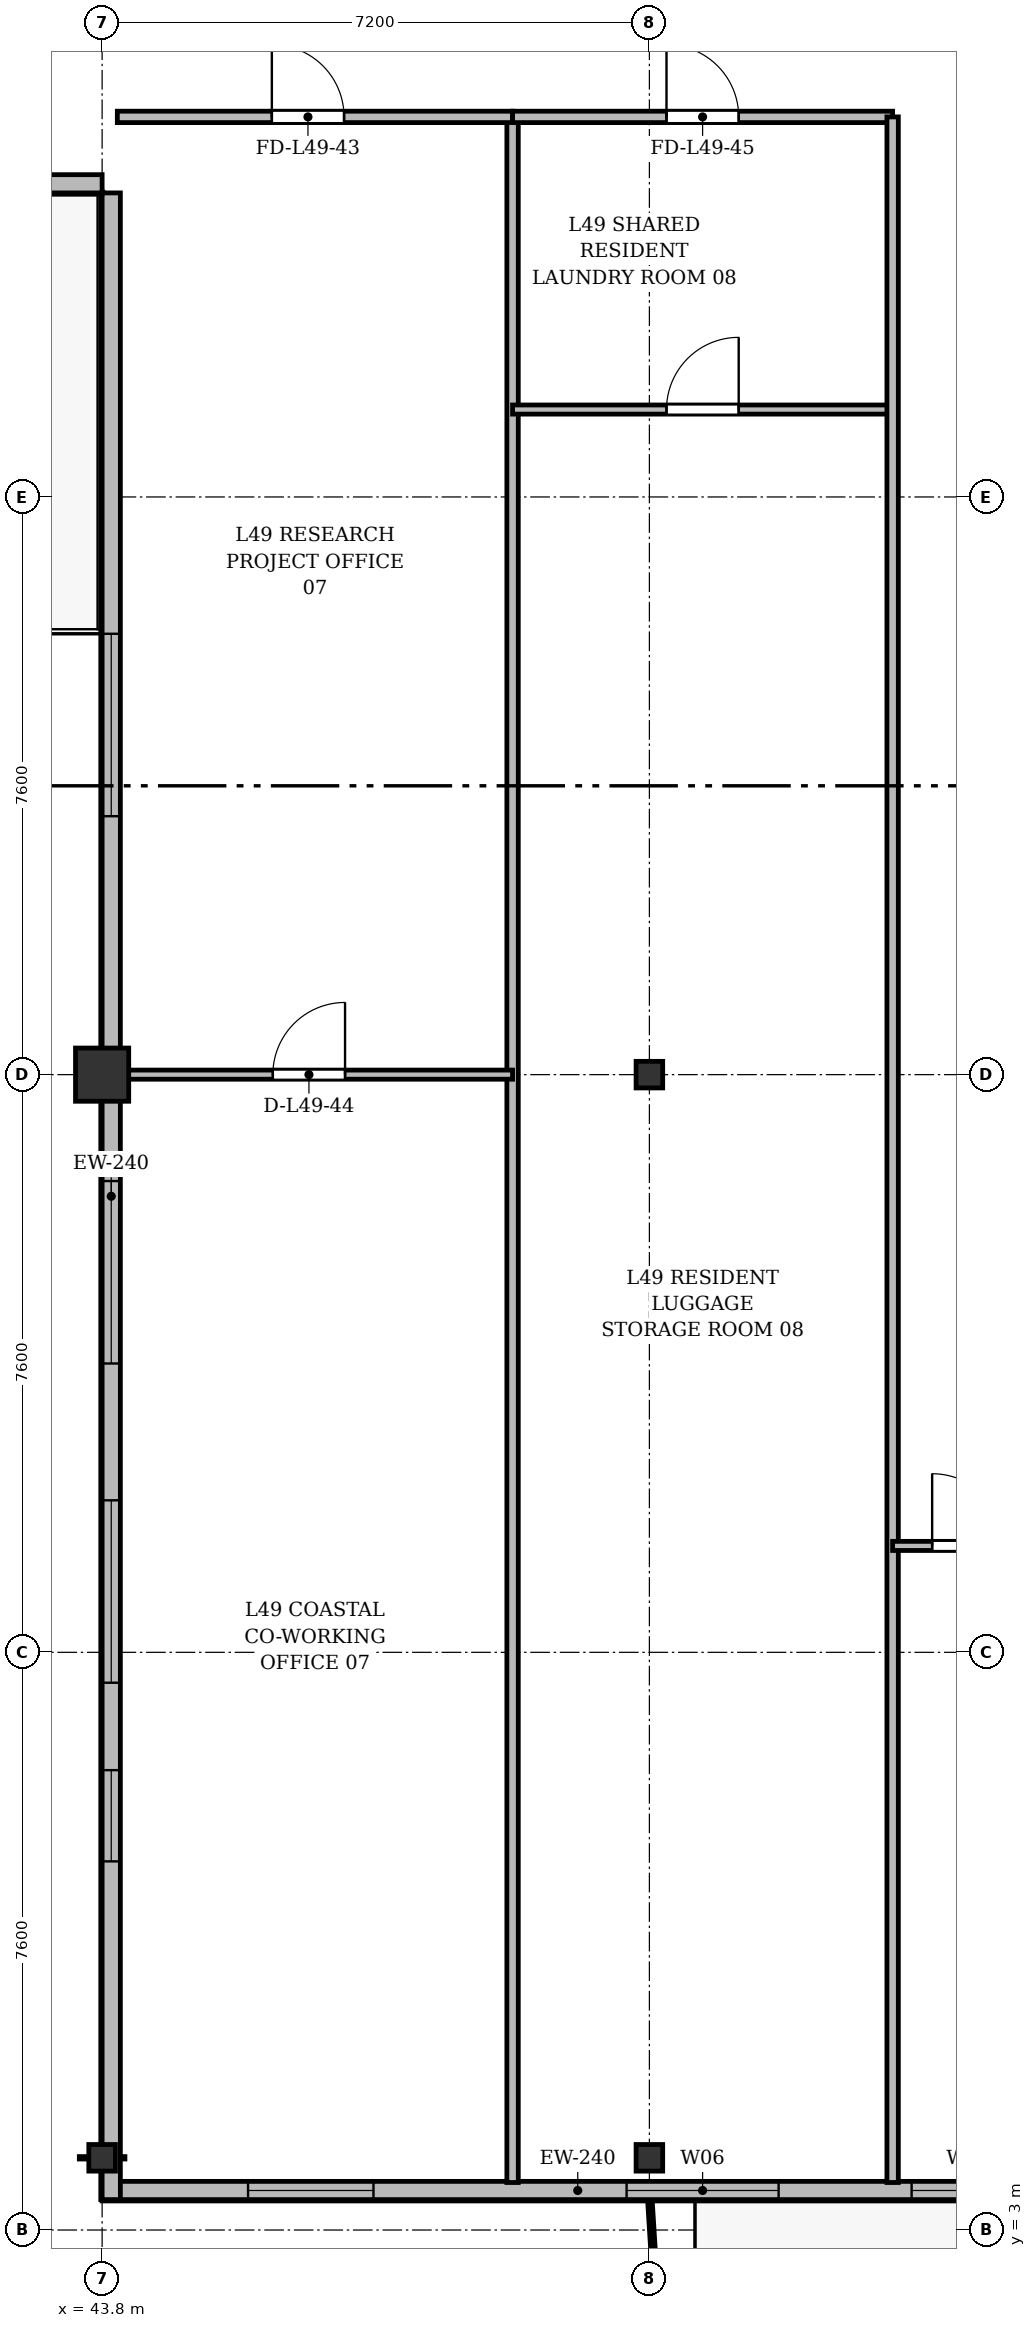
"""IFC4 building model, lengths in metres.
Left out: names, types, materials, properties, quantities, classifications, styles, units other than length and angle.
Written with IfcOpenShell. Run it as: python <this file> out.ifc"""

import sys

from ifc_helpers import new_model, si_unit, direction, frame, frame_2d, origin, origin_2d, place, context, subcontext, project, spatial, rectangle, i_section, extrude, source, transform, mapped, element, fill, save


model = new_model("IFC4")
c1 = context("Model", 3, precision=1e-05, world=origin(), true_north=direction((0.0, 1.0)))
c2 = subcontext(c1, "Body", "Model", "MODEL_VIEW")
j1 = project(units=[si_unit("LENGTHUNIT", "METRE"), si_unit("PLANEANGLEUNIT", "RADIAN")], contexts=[c1])
p1 = place(None, origin())
s1 = spatial("IfcSite", under=j1, at=p1, CompositionType="ELEMENT")
p2 = place(p1, origin())
s2 = spatial("IfcBuilding", under=s1, at=p2, CompositionType="ELEMENT")
p3 = place(p2, frame((0.0, 0.0, 190.5)))
s3 = spatial("IfcBuildingStorey", under=s2, at=p3, CompositionType="ELEMENT", Elevation=190.5)
m1 = source(origin(), c2, "Body", "SweptSolid", [
    extrude(i_section(OverallWidth=0.35, OverallDepth=0.35, WebThickness=0.018, FlangeThickness=0.028, at=origin_2d()), origin(), (0.0, 0.0, 1.0), 3.6),
])
p4 = place(p3, frame((43.8, 3.95, 0.0), z_axis=(0.0, 0.0, 1.0), x_axis=(1.0, 0.0, 0.0)))
e1 = element("IfcColumn", 1, at=p4, inside=s3, PredefinedType="COLUMN", context=c2, shape_type="MappedRepresentation", body=[
    mapped(m1, transform((0.0, 0.0, 0.0), x_axis=(1.0, 0.0, 0.0), y_axis=(0.0, 1.0, 0.0), z_axis=(0.0, 0.0, 1.0), scale=1.0)),
])
m2 = source(origin(), c2, "Body", "SweptSolid", [
    extrude(rectangle(XDim=0.7, YDim=0.7, at=origin_2d()), origin(), (0.0, 0.0, 1.0), 3.6),
])
p5 = place(p3, frame((43.8, 18.2, 0.0), z_axis=(0.0, 0.0, 1.0), x_axis=(1.0, 0.0, 0.0)))
e2 = element("IfcColumn", 2, at=p5, inside=s3, PredefinedType="COLUMN", context=c2, shape_type="MappedRepresentation", body=[
    mapped(m2, transform((0.0, 0.0, 0.0), x_axis=(1.0, 0.0, 0.0), y_axis=(0.0, 1.0, 0.0), z_axis=(0.0, 0.0, 1.0), scale=1.0)),
])
for number, where, z_axis, x_axis in (
    (3, (51.0, 3.95, 0.0), (0.0, 0.0, 1.0), (1.0, 0.0, 0.0)),
    (4, (51.0, 18.2, 0.0), (0.0, 0.0, 1.0), (1.0, 0.0, 0.0)),
):
    element("IfcColumn", number, at=place(p3, frame(where, z_axis=z_axis, x_axis=x_axis)), inside=s3, PredefinedType="COLUMN", context=c2, shape_type="MappedRepresentation", body=[
        mapped(m1, transform((0.0, 0.0, 0.0), x_axis=(1.0, 0.0, 0.0), y_axis=(0.0, 1.0, 0.0), z_axis=(0.0, 0.0, 1.0), scale=1.0)),
    ])
p6 = place(p3, frame((63.4, 3.52, 0.0), z_axis=(0.0, 0.0, 1.0), x_axis=(-1.0, 0.0, 0.0)))
e5 = element("IfcWall", 5, at=p6, inside=s3, PredefinedType="SOLIDWALL", context=c2, shape_type="SweptSolid", body=[
    extrude(rectangle(XDim=19.6, YDim=0.24, at=frame_2d((9.8, 0.0))), origin(), (0.0, 0.0, 1.0), 3.36),
])
p7 = place(p6, frame((0.32, 0.0, 0.9)))
e6 = element("IfcOpeningElement", 6, at=p7, cuts=e5, PredefinedType="OPENING", context=c2, shape_type="SweptSolid", body=[
    extrude(rectangle(XDim=1.65, YDim=1.85, at=frame_2d((0.825, 0.925))), frame((0.0, 0.13, 0.0), z_axis=(0.0, -1.0, 0.0), x_axis=(1.0, 0.0, 0.0)), (0.0, 0.0, 1.0), 0.26),
])
p8 = place(p6, frame((2.55, 0.0, 0.9)))
e7 = element("IfcOpeningElement", 7, at=p8, cuts=e5, PredefinedType="OPENING", context=c2, shape_type="SweptSolid", body=[
    extrude(rectangle(XDim=1.8, YDim=1.8, at=frame_2d((0.9, 0.9))), frame((0.0, 0.13, 0.0), z_axis=(0.0, -1.0, 0.0), x_axis=(1.0, 0.0, 0.0)), (0.0, 0.0, 1.0), 0.26),
])
p9 = place(p6, frame((5.585, 0.0, 0.0)))
e8 = element("IfcOpeningElement", 8, at=p9, cuts=e5, PredefinedType="OPENING", context=c2, shape_type="SweptSolid", body=[
    extrude(rectangle(XDim=1.2, YDim=2.2, at=frame_2d((0.6, 1.1))), frame((0.0, 0.13, 0.0), z_axis=(0.0, -1.0, 0.0), x_axis=(1.0, 0.0, 0.0)), (0.0, 0.0, 1.0), 0.26),
])
p10 = place(p6, frame((7.45, 0.0, 0.9)))
e9 = element("IfcOpeningElement", 9, at=p10, cuts=e5, PredefinedType="OPENING", context=c2, shape_type="SweptSolid", body=[
    extrude(rectangle(XDim=1.5, YDim=1.75, at=frame_2d((0.75, 0.875))), frame((0.0, 0.13, 0.0), z_axis=(0.0, -1.0, 0.0), x_axis=(1.0, 0.0, 0.0)), (0.0, 0.0, 1.0), 0.26),
])
p11 = place(p6, frame((10.7, 0.0, 0.9)))
e10 = element("IfcOpeningElement", 10, at=p11, cuts=e5, PredefinedType="OPENING", context=c2, shape_type="SweptSolid", body=[
    extrude(rectangle(XDim=2.0, YDim=1.95, at=frame_2d((1.0, 0.975))), frame((0.0, 0.13, 0.0), z_axis=(0.0, -1.0, 0.0), x_axis=(1.0, 0.0, 0.0)), (0.0, 0.0, 1.0), 0.26),
])
p12 = place(p6, frame((16.03, 0.0, 0.9)))
e11 = element("IfcOpeningElement", 11, at=p12, cuts=e5, PredefinedType="OPENING", context=c2, shape_type="SweptSolid", body=[
    extrude(rectangle(XDim=1.65, YDim=1.85, at=frame_2d((0.825, 0.925))), frame((0.0, 0.13, 0.0), z_axis=(0.0, -1.0, 0.0), x_axis=(1.0, 0.0, 0.0)), (0.0, 0.0, 1.0), 0.26),
])
p13 = place(p3, frame((43.92, 3.4, 0.0), z_axis=(0.0, 0.0, 1.0), x_axis=(0.0, 1.0, 0.0)))
e12 = element("IfcWall", 12, at=p13, inside=s3, PredefinedType="SOLIDWALL", context=c2, shape_type="SweptSolid", body=[
    extrude(rectangle(XDim=26.4, YDim=0.24, at=frame_2d((13.2, 0.0))), origin(), (0.0, 0.0, 1.0), 2.86),
])
p14 = place(p13, frame((4.45, 0.0, 0.92)))
e13 = element("IfcOpeningElement", 13, at=p14, cuts=e12, PredefinedType="OPENING", context=c2, shape_type="SweptSolid", body=[
    extrude(rectangle(XDim=1.2, YDim=1.65, at=frame_2d((0.6, 0.825))), frame((0.0, 0.13, 0.0), z_axis=(0.0, -1.0, 0.0), x_axis=(1.0, 0.0, 0.0)), (0.0, 0.0, 1.0), 0.26),
])
p15 = place(p13, frame((6.8, 0.0, 0.92)))
e14 = element("IfcOpeningElement", 14, at=p15, cuts=e12, PredefinedType="OPENING", context=c2, shape_type="SweptSolid", body=[
    extrude(rectangle(XDim=2.4, YDim=1.84, at=frame_2d((1.2, 0.92))), frame((0.0, 0.13, 0.0), z_axis=(0.0, -1.0, 0.0), x_axis=(1.0, 0.0, 0.0)), (0.0, 0.0, 1.0), 0.26),
])
p16 = place(p13, frame((11.0, 0.0, 0.92)))
e15 = element("IfcOpeningElement", 15, at=p16, cuts=e12, PredefinedType="OPENING", context=c2, shape_type="SweptSolid", body=[
    extrude(rectangle(XDim=2.4, YDim=1.84, at=frame_2d((1.2, 0.92))), frame((0.0, 0.13, 0.0), z_axis=(0.0, -1.0, 0.0), x_axis=(1.0, 0.0, 0.0)), (0.0, 0.0, 1.0), 0.26),
])
p17 = place(p13, frame((18.2, 0.0, 0.92)))
e16 = element("IfcOpeningElement", 16, at=p17, cuts=e12, PredefinedType="OPENING", context=c2, shape_type="SweptSolid", body=[
    extrude(rectangle(XDim=2.4, YDim=1.84, at=frame_2d((1.2, 0.92))), frame((0.0, 0.13, 0.0), z_axis=(0.0, -1.0, 0.0), x_axis=(1.0, 0.0, 0.0)), (0.0, 0.0, 1.0), 0.26),
])
p18 = place(p3, frame((43.8, 29.92, 0.0), z_axis=(0.0, 0.0, 1.0), x_axis=(-1.0, 0.0, 0.0)))
e17 = element("IfcWall", 17, at=p18, inside=s3, PredefinedType="SOLIDWALL", context=c2, shape_type="SweptSolid", body=[
    extrude(rectangle(XDim=13.2, YDim=0.24, at=frame_2d((6.6, 0.0))), origin(), (0.0, 0.0, 1.0), 2.86),
])
p19 = place(p18, frame((6.0, 0.0, 0.0)))
e18 = element("IfcOpeningElement", 18, at=p19, cuts=e17, PredefinedType="OPENING", context=c2, shape_type="SweptSolid", body=[
    extrude(rectangle(XDim=1.2, YDim=2.2, at=frame_2d((0.6, 1.1))), frame((0.0, 0.13, 0.0), z_axis=(0.0, -1.0, 0.0), x_axis=(1.0, 0.0, 0.0)), (0.0, 0.0, 1.0), 0.26),
])
p20 = place(p3, frame((49.2, 3.625, 0.0), z_axis=(0.0, 0.0, 1.0), x_axis=(0.0, 1.0, 0.0)))
e19 = element("IfcWall", 19, at=p20, inside=s3, PredefinedType="PARTITIONING", context=c2, shape_type="SweptSolid", body=[
    extrude(rectangle(XDim=27.175, YDim=0.15, at=frame_2d((13.587, 0.0))), origin(), (0.0, 0.0, 1.0), 2.91),
])
p21 = place(p3, frame((44.0, 30.8, 0.0), z_axis=(0.0, 0.0, 1.0), x_axis=(1.0, 0.0, 0.0)))
e20 = element("IfcWall", 20, at=p21, inside=s3, PredefinedType="PARTITIONING", context=c2, shape_type="SweptSolid", body=[
    extrude(rectangle(XDim=5.2, YDim=0.15, at=frame_2d((2.6, 0.0))), origin(), (0.0, 0.0, 1.0), 3.36),
])
p22 = place(p21, frame((2.033, 0.0, 0.0)))
e21 = element("IfcOpeningElement", 21, at=p22, cuts=e20, PredefinedType="OPENING", context=c2, shape_type="SweptSolid", body=[
    extrude(rectangle(XDim=0.95, YDim=2.15, at=frame_2d((0.475, 1.075))), frame((0.0, 0.085, 0.0), z_axis=(0.0, -1.0, 0.0), x_axis=(1.0, 0.0, 0.0)), (0.0, 0.0, 1.0), 0.17),
])
p23 = place(p3, frame((44.025, 18.2, 0.0), z_axis=(0.0, 0.0, 1.0), x_axis=(1.0, 0.0, 0.0)))
e22 = element("IfcWall", 22, at=p23, inside=s3, PredefinedType="PARTITIONING", context=c2, shape_type="SweptSolid", body=[
    extrude(rectangle(XDim=5.175, YDim=0.12, at=frame_2d((2.587, 0.0))), origin(), (0.0, 0.0, 1.0), 2.91),
])
p24 = place(p23, frame((2.021, 0.0, 0.0)))
e23 = element("IfcOpeningElement", 23, at=p24, cuts=e22, PredefinedType="OPENING", context=c2, shape_type="SweptSolid", body=[
    extrude(rectangle(XDim=0.95, YDim=2.15, at=frame_2d((0.475, 1.075))), frame((0.0, 0.07, 0.0), z_axis=(0.0, -1.0, 0.0), x_axis=(1.0, 0.0, 0.0)), (0.0, 0.0, 1.0), 0.14),
])
p25 = place(p3, frame((49.2, 30.8, 0.0), z_axis=(0.0, 0.0, 1.0), x_axis=(1.0, 0.0, 0.0)))
e24 = element("IfcWall", 24, at=p25, inside=s3, PredefinedType="PARTITIONING", context=c2, shape_type="SweptSolid", body=[
    extrude(rectangle(XDim=5.0, YDim=0.15, at=frame_2d((2.5, 0.0))), origin(), (0.0, 0.0, 1.0), 2.86),
])
p26 = place(p25, frame((2.025, 0.0, 0.0)))
e25 = element("IfcOpeningElement", 25, at=p26, cuts=e24, PredefinedType="OPENING", context=c2, shape_type="SweptSolid", body=[
    extrude(rectangle(XDim=0.95, YDim=2.15, at=frame_2d((0.475, 1.075))), frame((0.0, 0.085, 0.0), z_axis=(0.0, -1.0, 0.0), x_axis=(1.0, 0.0, 0.0)), (0.0, 0.0, 1.0), 0.17),
])
p27 = place(p3, frame((49.2, 26.95, 0.0), z_axis=(0.0, 0.0, 1.0), x_axis=(1.0, 0.0, 0.0)))
e26 = element("IfcWall", 26, at=p27, inside=s3, PredefinedType="PARTITIONING", context=c2, shape_type="SweptSolid", body=[
    extrude(rectangle(XDim=5.0, YDim=0.12, at=frame_2d((2.5, 0.0))), origin(), (0.0, 0.0, 1.0), 2.86),
])
p28 = place(p27, frame((2.025, 0.0, 0.0)))
e27 = element("IfcOpeningElement", 27, at=p28, cuts=e26, PredefinedType="OPENING", context=c2, shape_type="SweptSolid", body=[
    extrude(rectangle(XDim=0.95, YDim=2.15, at=frame_2d((0.475, 1.075))), frame((0.0, 0.07, 0.0), z_axis=(0.0, -1.0, 0.0), x_axis=(1.0, 0.0, 0.0)), (0.0, 0.0, 1.0), 0.14),
])
p29 = place(p3, frame((54.2, 3.625, 0.0), z_axis=(0.0, 0.0, 1.0), x_axis=(0.0, 1.0, 0.0)))
e28 = element("IfcWall", 28, at=p29, inside=s3, PredefinedType="PARTITIONING", context=c2, shape_type="SweptSolid", body=[
    extrude(rectangle(XDim=27.175, YDim=0.15, at=frame_2d((13.587, 0.0))), origin(), (0.0, 0.0, 1.0), 2.91),
])
p30 = place(p3, frame((54.2, 12.0, 0.0), z_axis=(0.0, 0.0, 1.0), x_axis=(1.0, 0.0, 0.0)))
e29 = element("IfcWall", 29, at=p30, inside=s3, PredefinedType="PARTITIONING", context=c2, shape_type="SweptSolid", body=[
    extrude(rectangle(XDim=2.0, YDim=0.12, at=frame_2d((1.0, 0.0))), origin(), (0.0, 0.0, 1.0), 3.36),
])
p31 = place(p30, frame((0.52, 0.0, 0.0)))
e30 = element("IfcOpeningElement", 30, at=p31, cuts=e29, PredefinedType="OPENING", context=c2, shape_type="SweptSolid", body=[
    extrude(rectangle(XDim=0.95, YDim=2.15, at=frame_2d((0.475, 1.075))), frame((0.0, 0.07, 0.0), z_axis=(0.0, -1.0, 0.0), x_axis=(1.0, 0.0, 0.0)), (0.0, 0.0, 1.0), 0.14),
])
m3 = source(origin(), c2, "Body", "SweptSolid", [
    extrude(rectangle(XDim=1.5, YDim=1.75, at=frame_2d((0.75, 0.875))), frame((0.0, 0.03, 0.0), z_axis=(0.0, -1.0, 0.0), x_axis=(1.0, 0.0, 0.0)), (0.0, 0.0, 1.0), 0.06),
])
p32 = place(p10, origin())
e31 = element("IfcWindow", 31, at=p32, inside=s3, PartitioningType="SINGLE_PANEL", PredefinedType="WINDOW", context=c2, shape_type="MappedRepresentation", body=[
    mapped(m3, transform((0.0, 0.0, 0.0), x_axis=(1.0, 0.0, 0.0), y_axis=(0.0, 1.0, 0.0), z_axis=(0.0, 0.0, 1.0), scale=1.0)),
])
fill(e9, e31)
m4 = source(origin(), c2, "Body", "SweptSolid", [
    extrude(rectangle(XDim=2.0, YDim=1.95, at=frame_2d((1.0, 0.975))), frame((0.0, 0.03, 0.0), z_axis=(0.0, -1.0, 0.0), x_axis=(1.0, 0.0, 0.0)), (0.0, 0.0, 1.0), 0.06),
])
p33 = place(p11, origin())
e32 = element("IfcWindow", 32, at=p33, inside=s3, PartitioningType="SINGLE_PANEL", PredefinedType="WINDOW", context=c2, shape_type="MappedRepresentation", body=[
    mapped(m4, transform((0.0, 0.0, 0.0), x_axis=(1.0, 0.0, 0.0), y_axis=(0.0, 1.0, 0.0), z_axis=(0.0, 0.0, 1.0), scale=1.0)),
])
fill(e10, e32)
m5 = source(origin(), c2, "Body", "SweptSolid", [
    extrude(rectangle(XDim=1.65, YDim=1.85, at=frame_2d((0.825, 0.925))), frame((0.0, 0.03, 0.0), z_axis=(0.0, -1.0, 0.0), x_axis=(1.0, 0.0, 0.0)), (0.0, 0.0, 1.0), 0.06),
])
p34 = place(p12, origin())
e33 = element("IfcWindow", 33, at=p34, inside=s3, PartitioningType="SINGLE_PANEL", PredefinedType="WINDOW", context=c2, shape_type="MappedRepresentation", body=[
    mapped(m5, transform((0.0, 0.0, 0.0), x_axis=(1.0, 0.0, 0.0), y_axis=(0.0, 1.0, 0.0), z_axis=(0.0, 0.0, 1.0), scale=1.0)),
])
fill(e11, e33)
m6 = source(origin(), c2, "Body", "SweptSolid", [
    extrude(rectangle(XDim=1.2, YDim=1.65, at=frame_2d((0.6, 0.825))), frame((0.0, 0.03, 0.0), z_axis=(0.0, -1.0, 0.0), x_axis=(1.0, 0.0, 0.0)), (0.0, 0.0, 1.0), 0.06),
])
p35 = place(p14, origin())
e34 = element("IfcWindow", 34, at=p35, inside=s3, PartitioningType="SINGLE_PANEL", PredefinedType="WINDOW", context=c2, shape_type="MappedRepresentation", body=[
    mapped(m6, transform((0.0, 0.0, 0.0), x_axis=(1.0, 0.0, 0.0), y_axis=(0.0, 1.0, 0.0), z_axis=(0.0, 0.0, 1.0), scale=1.0)),
])
fill(e13, e34)
m7 = source(origin(), c2, "Body", "SweptSolid", [
    extrude(rectangle(XDim=2.4, YDim=1.84, at=frame_2d((1.2, 0.92))), frame((0.0, 0.03, 0.0), z_axis=(0.0, -1.0, 0.0), x_axis=(1.0, 0.0, 0.0)), (0.0, 0.0, 1.0), 0.06),
])
p36 = place(p15, origin())
e35 = element("IfcWindow", 35, at=p36, inside=s3, PartitioningType="SINGLE_PANEL", PredefinedType="WINDOW", context=c2, shape_type="MappedRepresentation", body=[
    mapped(m7, transform((0.0, 0.0, 0.0), x_axis=(1.0, 0.0, 0.0), y_axis=(0.0, 1.0, 0.0), z_axis=(0.0, 0.0, 1.0), scale=1.0)),
])
fill(e14, e35)
p37 = place(p16, origin())
e36 = element("IfcWindow", 36, at=p37, inside=s3, PartitioningType="SINGLE_PANEL", PredefinedType="WINDOW", context=c2, shape_type="MappedRepresentation", body=[
    mapped(m7, transform((0.0, 0.0, 0.0), x_axis=(1.0, 0.0, 0.0), y_axis=(0.0, 1.0, 0.0), z_axis=(0.0, 0.0, 1.0), scale=1.0)),
])
fill(e15, e36)
p38 = place(p17, origin())
e37 = element("IfcWindow", 37, at=p38, inside=s3, PartitioningType="SINGLE_PANEL", PredefinedType="WINDOW", context=c2, shape_type="MappedRepresentation", body=[
    mapped(m7, transform((0.0, 0.0, 0.0), x_axis=(1.0, 0.0, 0.0), y_axis=(0.0, 1.0, 0.0), z_axis=(0.0, 0.0, 1.0), scale=1.0)),
])
fill(e16, e37)
m8 = source(origin(), c2, "Body", "SweptSolid", [
    extrude(rectangle(XDim=0.95, YDim=2.15, at=frame_2d((0.475, 1.075))), frame((0.0, 0.025, 0.0), z_axis=(0.0, -1.0, 0.0), x_axis=(1.0, 0.0, 0.0)), (0.0, 0.0, 1.0), 0.05),
])
p39 = place(p22, origin())
e38 = element("IfcDoor", 38, at=p39, inside=s3, OperationType="SINGLE_SWING_LEFT", PredefinedType="DOOR", context=c2, shape_type="MappedRepresentation", body=[
    mapped(m8, transform((0.0, 0.0, 0.0), x_axis=(1.0, 0.0, 0.0), y_axis=(0.0, 1.0, 0.0), z_axis=(0.0, 0.0, 1.0), scale=1.0)),
])
fill(e21, e38)
p40 = place(p24, origin())
e39 = element("IfcDoor", 39, at=p40, inside=s3, OperationType="SINGLE_SWING_RIGHT", PredefinedType="DOOR", context=c2, shape_type="MappedRepresentation", body=[
    mapped(m8, transform((0.0, 0.0, 0.0), x_axis=(1.0, 0.0, 0.0), y_axis=(0.0, 1.0, 0.0), z_axis=(0.0, 0.0, 1.0), scale=1.0)),
])
fill(e23, e39)
p41 = place(p26, origin())
e40 = element("IfcDoor", 40, at=p41, inside=s3, OperationType="SINGLE_SWING_LEFT", PredefinedType="DOOR", context=c2, shape_type="MappedRepresentation", body=[
    mapped(m8, transform((0.0, 0.0, 0.0), x_axis=(1.0, 0.0, 0.0), y_axis=(0.0, 1.0, 0.0), z_axis=(0.0, 0.0, 1.0), scale=1.0)),
])
fill(e25, e40)
p42 = place(p28, origin())
e41 = element("IfcDoor", 41, at=p42, inside=s3, OperationType="SINGLE_SWING_RIGHT", PredefinedType="DOOR", context=c2, shape_type="MappedRepresentation", body=[
    mapped(m8, transform((0.0, 0.0, 0.0), x_axis=(1.0, 0.0, 0.0), y_axis=(0.0, 1.0, 0.0), z_axis=(0.0, 0.0, 1.0), scale=1.0)),
])
fill(e27, e41)
p43 = place(p31, origin())
e42 = element("IfcDoor", 42, at=p43, inside=s3, OperationType="SINGLE_SWING_LEFT", PredefinedType="DOOR", context=c2, shape_type="MappedRepresentation", body=[
    mapped(m8, transform((0.0, 0.0, 0.0), x_axis=(1.0, 0.0, 0.0), y_axis=(0.0, 1.0, 0.0), z_axis=(0.0, 0.0, 1.0), scale=1.0)),
])
fill(e30, e42)
save(model, sys.argv[1])
